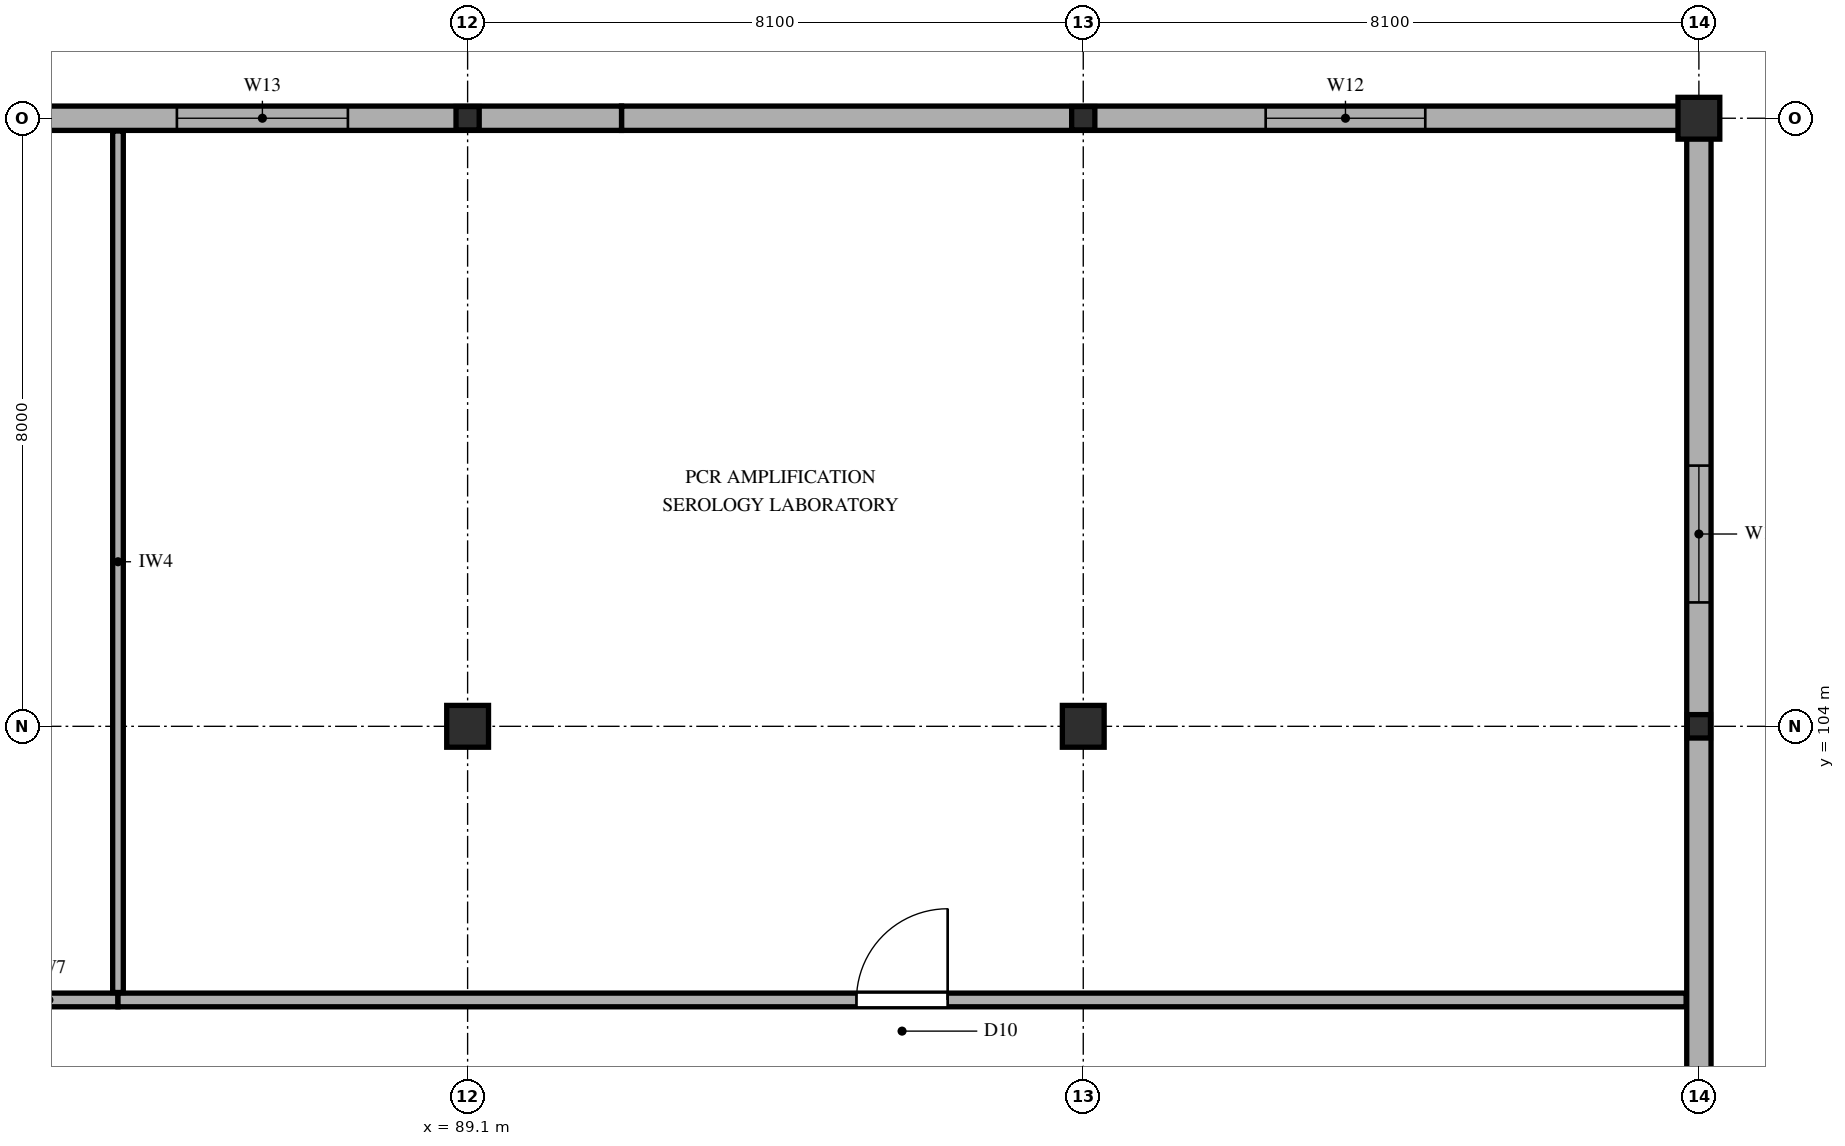
"""IFC4 building model, lengths in metres.
Left out: names, types, materials, properties, quantities, classifications, styles, units other than length and angle.
Written with IfcOpenShell. Run it as: python <this file> out.ifc"""

import sys

from ifc_helpers import new_model, si_unit, direction, frame, frame_2d, origin, origin_2d, place, context, subcontext, project, spatial, rectangle, i_section, extrude, element, fill, save


model = new_model("IFC4")
c1 = context("Model", 3, precision=1e-05, world=origin(), true_north=direction((0.0, 1.0)))
c2 = subcontext(c1, "Body", "Model", "MODEL_VIEW")
j1 = project(units=[si_unit("LENGTHUNIT", "METRE"), si_unit("PLANEANGLEUNIT", "RADIAN")], contexts=[c1])
p1 = place(None, origin())
s1 = spatial("IfcSite", under=j1, at=p1, CompositionType="ELEMENT")
p2 = place(p1, origin())
s2 = spatial("IfcBuilding", under=s1, at=p2, CompositionType="ELEMENT")
p3 = place(p2, frame((0.0, 0.0, 14.7)))
s3 = spatial("IfcBuildingStorey", under=s2, at=p3, CompositionType="ELEMENT", Elevation=14.7)
p4 = place(p3, frame((89.1, 104.0, 0.0), z_axis=(0.0, 0.0, 1.0), x_axis=(1.0, 0.0, 0.0)))
e1 = element("IfcColumn", 1, at=p4, inside=s3, PredefinedType="COLUMN", context=c2, shape_type="SweptSolid", body=[
    extrude(rectangle(XDim=0.55, YDim=0.55, at=origin_2d()), origin(), (0.0, 0.0, 1.0), 5.1),
])
p5 = place(p3, frame((89.1, 112.0, 0.0), z_axis=(0.0, 0.0, 1.0), x_axis=(1.0, 0.0, 0.0)))
e2 = element("IfcColumn", 2, at=p5, inside=s3, PredefinedType="COLUMN", context=c2, shape_type="SweptSolid", body=[
    extrude(i_section(OverallWidth=0.305, OverallDepth=0.308, WebThickness=0.01, FlangeThickness=0.015, FilletRadius=0.015, at=origin_2d()), origin(), (0.0, 0.0, 1.0), 5.1),
])
p6 = place(p3, frame((97.2, 104.0, 0.0), z_axis=(0.0, 0.0, 1.0), x_axis=(1.0, 0.0, 0.0)))
e3 = element("IfcColumn", 3, at=p6, inside=s3, PredefinedType="COLUMN", context=c2, shape_type="SweptSolid", body=[
    extrude(rectangle(XDim=0.55, YDim=0.55, at=origin_2d()), origin(), (0.0, 0.0, 1.0), 5.1),
])
for number, where, z_axis, x_axis in (
    (4, (97.2, 112.0, 0.0), (0.0, 0.0, 1.0), (1.0, 0.0, 0.0)),
    (5, (105.3, 104.0, 0.0), (0.0, 0.0, 1.0), (1.0, 0.0, 0.0)),
):
    element("IfcColumn", number, at=place(p3, frame(where, z_axis=z_axis, x_axis=x_axis)), inside=s3, PredefinedType="COLUMN", context=c2, shape_type="SweptSolid", body=[
        extrude(i_section(OverallWidth=0.305, OverallDepth=0.308, WebThickness=0.01, FlangeThickness=0.015, FilletRadius=0.015, at=origin_2d()), origin(), (0.0, 0.0, 1.0), 5.1),
    ])
p7 = place(p3, frame((105.3, 112.0, 0.0), z_axis=(0.0, 0.0, 1.0), x_axis=(1.0, 0.0, 0.0)))
e6 = element("IfcColumn", 6, at=p7, inside=s3, PredefinedType="COLUMN", context=c2, shape_type="SweptSolid", body=[
    extrude(rectangle(XDim=0.55, YDim=0.55, at=origin_2d()), origin(), (0.0, 0.0, 1.0), 5.1),
])
p8 = place(p3, frame((105.3, 96.18, 0.0), z_axis=(0.0, 0.0, 1.0), x_axis=(0.0, 1.0, 0.0)))
e7 = element("IfcWall", 7, at=p8, inside=s3, PredefinedType="SOLIDWALL", context=c2, shape_type="SweptSolid", body=[
    extrude(rectangle(XDim=15.82, YDim=0.32, at=frame_2d((7.91, 0.0))), origin(), (0.0, 0.0, 1.0), 4.332),
])
p9 = place(p8, frame((9.45, 0.0, 0.85)))
e8 = element("IfcOpeningElement", 8, at=p9, cuts=e7, PredefinedType="OPENING", context=c2, shape_type="SweptSolid", body=[
    extrude(rectangle(XDim=1.8, YDim=2.4, at=frame_2d((0.9, 1.2))), frame((0.0, 0.17, 0.0), z_axis=(0.0, -1.0, 0.0), x_axis=(1.0, 0.0, 0.0)), (0.0, 0.0, 1.0), 0.34),
])
p10 = place(p3, frame((105.3, 112.0, 0.0), z_axis=(0.0, 0.0, 1.0), x_axis=(-1.0, 0.0, 0.0)))
e9 = element("IfcWall", 9, at=p10, inside=s3, PredefinedType="SOLIDWALL", context=c2, shape_type="SweptSolid", body=[
    extrude(rectangle(XDim=14.175, YDim=0.32, at=frame_2d((7.087, 0.0))), origin(), (0.0, 0.0, 1.0), 4.232),
])
p11 = place(p10, frame((3.6, 0.0, 0.95)))
e10 = element("IfcOpeningElement", 10, at=p11, cuts=e9, PredefinedType="OPENING", context=c2, shape_type="SweptSolid", body=[
    extrude(rectangle(XDim=2.1, YDim=1.8, at=frame_2d((1.05, 0.9))), frame((0.0, 0.17, 0.0), z_axis=(0.0, -1.0, 0.0), x_axis=(1.0, 0.0, 0.0)), (0.0, 0.0, 1.0), 0.34),
])
p12 = place(p3, frame((91.125, 112.0, 0.0), z_axis=(0.0, 0.0, 1.0), x_axis=(-1.0, 0.0, 0.0)))
e11 = element("IfcWall", 11, at=p12, inside=s3, PredefinedType="SOLIDWALL", context=c2, shape_type="SweptSolid", body=[
    extrude(rectangle(XDim=14.175, YDim=0.32, at=frame_2d((7.087, 0.0))), origin(), (0.0, 0.0, 1.0), 4.232),
])
p13 = place(p12, frame((3.6, 0.0, 0.95)))
e12 = element("IfcOpeningElement", 12, at=p13, cuts=e11, PredefinedType="OPENING", context=c2, shape_type="SweptSolid", body=[
    extrude(rectangle(XDim=2.25, YDim=1.8, at=frame_2d((1.125, 0.9))), frame((0.0, 0.17, 0.0), z_axis=(0.0, -1.0, 0.0), x_axis=(1.0, 0.0, 0.0)), (0.0, 0.0, 1.0), 0.34),
])
p14 = place(p3, frame((65.4, 100.4, 0.0), z_axis=(0.0, 0.0, 1.0), x_axis=(1.0, 0.0, 0.0)))
e13 = element("IfcWall", 13, at=p14, inside=s3, PredefinedType="PARTITIONING", context=c2, shape_type="SweptSolid", body=[
    extrude(rectangle(XDim=19.1, YDim=0.18, at=frame_2d((9.55, 0.0))), origin(), (0.0, 0.0, 1.0), 4.84),
])
p15 = place(p14, frame((8.95, 0.0, 0.0)))
e14 = element("IfcOpeningElement", 14, at=p15, cuts=e13, PredefinedType="OPENING", context=c2, shape_type="SweptSolid", body=[
    extrude(rectangle(XDim=1.2, YDim=2.3, at=frame_2d((0.6, 1.15))), frame((0.0, 0.1, 0.0), z_axis=(0.0, -1.0, 0.0), x_axis=(1.0, 0.0, 0.0)), (0.0, 0.0, 1.0), 0.2),
])
p16 = place(p3, frame((84.5, 100.4, 0.0), z_axis=(0.0, 0.0, 1.0), x_axis=(1.0, 0.0, 0.0)))
e15 = element("IfcWall", 15, at=p16, inside=s3, PredefinedType="PARTITIONING", context=c2, shape_type="SweptSolid", body=[
    extrude(rectangle(XDim=20.632, YDim=0.18, at=frame_2d((10.316, 0.0))), origin(), (0.0, 0.0, 1.0), 4.84),
])
p17 = place(p16, frame((9.716, 0.0, 0.0)))
e16 = element("IfcOpeningElement", 16, at=p17, cuts=e15, PredefinedType="OPENING", context=c2, shape_type="SweptSolid", body=[
    extrude(rectangle(XDim=1.2, YDim=2.3, at=frame_2d((0.6, 1.15))), frame((0.0, 0.1, 0.0), z_axis=(0.0, -1.0, 0.0), x_axis=(1.0, 0.0, 0.0)), (0.0, 0.0, 1.0), 0.2),
])
for number, where, z_axis, x_axis in (
    (17, (84.5, 100.498, 0.0), (0.0, 0.0, 1.0), (0.0, 1.0, 0.0)),
    (18, (84.5, 106.165, 0.0), (0.0, 0.0, 1.0), (0.0, 1.0, 0.0)),
):
    element("IfcWall", number, at=place(p3, frame(where, z_axis=z_axis, x_axis=x_axis)), inside=s3, PredefinedType="PARTITIONING", context=c2, shape_type="SweptSolid", body=[
        extrude(rectangle(XDim=5.667, YDim=0.14, at=frame_2d((2.833, 0.0))), origin(), (0.0, 0.0, 1.0), 4.84),
    ])
p18 = place(p9, origin())
e19 = element("IfcWindow", 19, at=p18, inside=s3, PartitioningType="TRIPLE_PANEL_VERTICAL", PredefinedType="WINDOW", context=c2, shape_type="SweptSolid", body=[
    extrude(rectangle(XDim=1.8, YDim=2.4, at=frame_2d((0.9, 1.2))), frame((0.0, 0.03, 0.0), z_axis=(0.0, -1.0, 0.0), x_axis=(1.0, 0.0, 0.0)), (0.0, 0.0, 1.0), 0.06),
])
fill(e8, e19)
p19 = place(p11, origin())
e20 = element("IfcWindow", 20, at=p19, inside=s3, PartitioningType="DOUBLE_PANEL_VERTICAL", PredefinedType="WINDOW", context=c2, shape_type="SweptSolid", body=[
    extrude(rectangle(XDim=2.1, YDim=1.8, at=frame_2d((1.05, 0.9))), frame((0.0, 0.03, 0.0), z_axis=(0.0, -1.0, 0.0), x_axis=(1.0, 0.0, 0.0)), (0.0, 0.0, 1.0), 0.06),
])
fill(e10, e20)
p20 = place(p13, origin())
e21 = element("IfcWindow", 21, at=p20, inside=s3, PartitioningType="TRIPLE_PANEL_VERTICAL", PredefinedType="WINDOW", context=c2, shape_type="SweptSolid", body=[
    extrude(rectangle(XDim=2.25, YDim=1.8, at=frame_2d((1.125, 0.9))), frame((0.0, 0.03, 0.0), z_axis=(0.0, -1.0, 0.0), x_axis=(1.0, 0.0, 0.0)), (0.0, 0.0, 1.0), 0.06),
])
fill(e12, e21)
p21 = place(p17, origin())
e22 = element("IfcDoor", 22, at=p21, inside=s3, OperationType="SINGLE_SWING_RIGHT", PredefinedType="DOOR", context=c2, shape_type="SweptSolid", body=[
    extrude(rectangle(XDim=1.2, YDim=2.3, at=frame_2d((0.6, 1.15))), frame((0.0, 0.025, 0.0), z_axis=(0.0, -1.0, 0.0), x_axis=(1.0, 0.0, 0.0)), (0.0, 0.0, 1.0), 0.05),
])
fill(e16, e22)
save(model, sys.argv[1])
